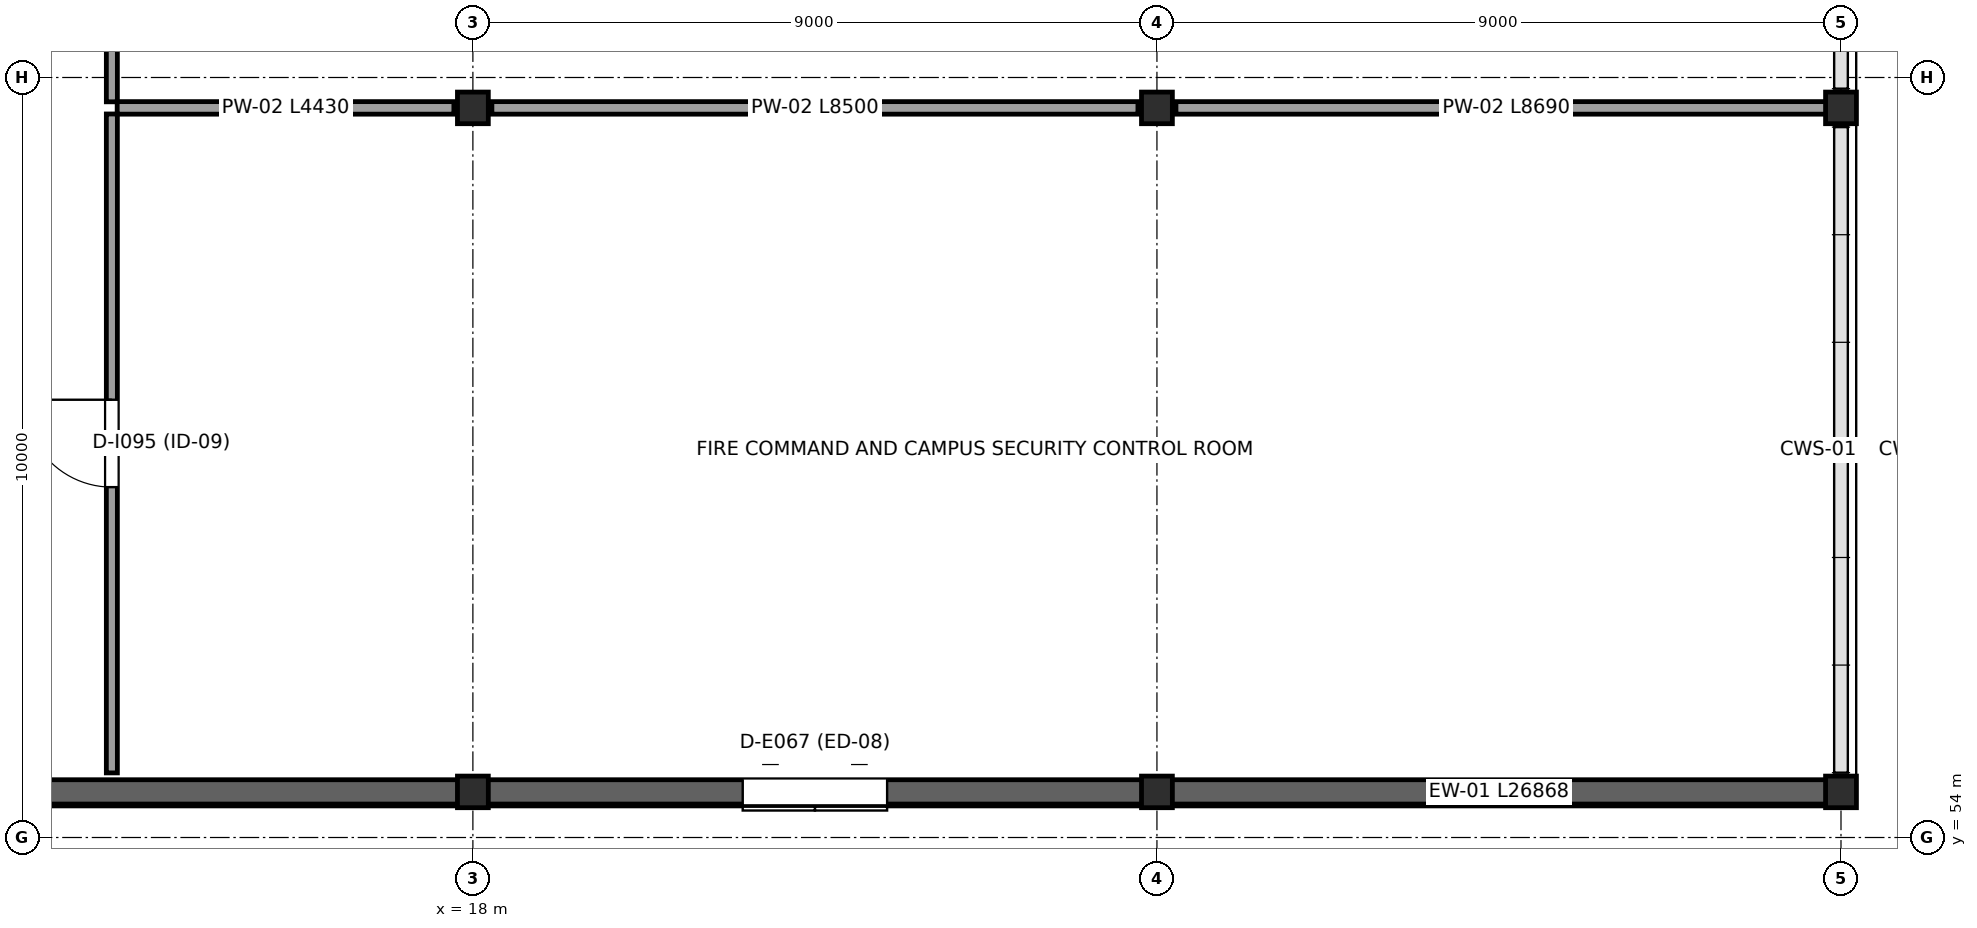
"""IFC4 building model, lengths in metres.
Left out: names, types, materials, properties, quantities, classifications, styles, units other than length and angle.
Written with IfcOpenShell. Run it as: python <this file> out.ifc"""

import sys

from ifc_helpers import new_model, si_unit, direction, frame, frame_2d, origin, origin_2d, place, context, subcontext, project, spatial, rectangle, i_section, extrude, element, fill, save


model = new_model("IFC4")
c1 = context("Model", 3, precision=1e-05, world=origin(), true_north=direction((0.0, 1.0)))
c2 = subcontext(c1, "Body", "Model", "MODEL_VIEW")
j1 = project(units=[si_unit("LENGTHUNIT", "METRE"), si_unit("PLANEANGLEUNIT", "RADIAN")], contexts=[c1])
p1 = place(None, origin())
s1 = spatial("IfcSite", under=j1, at=p1, CompositionType="ELEMENT")
p2 = place(p1, origin())
s2 = spatial("IfcBuilding", under=s1, at=p2, CompositionType="ELEMENT")
p3 = place(p2, origin())
s3 = spatial("IfcBuildingStorey", under=s2, at=p3, CompositionType="ELEMENT", Elevation=0.0)
for number, where, z_axis, x_axis in (
    (1, (18.0, 54.6, 0.0), (0.0, 0.0, 1.0), (1.0, 0.0, 0.0)),
    (2, (18.0, 63.6, 0.0), (0.0, 0.0, 1.0), (1.0, 0.0, 0.0)),
    (3, (27.0, 54.6, 0.0), (0.0, 0.0, 1.0), (1.0, 0.0, 0.0)),
    (4, (27.0, 63.6, 0.0), (0.0, 0.0, 1.0), (1.0, 0.0, 0.0)),
    (5, (36.0, 54.6, 0.0), (0.0, 0.0, 1.0), (1.0, 0.0, 0.0)),
    (6, (36.0, 63.6, 0.0), (0.0, 0.0, 1.0), (1.0, 0.0, 0.0)),
):
    element("IfcColumn", number, at=place(p3, frame(where, z_axis=z_axis, x_axis=x_axis)), inside=s3, PredefinedType="COLUMN", context=c2, shape_type="SweptSolid", body=[
        extrude(i_section(OverallWidth=0.406, OverallDepth=0.416, WebThickness=0.03, FlangeThickness=0.048, at=origin_2d()), origin(), (0.0, 0.0, 1.0), 6.0),
    ])
p4 = place(p3, frame((17.978, 54.6, 0.0), z_axis=(0.0, 0.0, 1.0), x_axis=(-1.0, 0.0, 0.0)))
e7 = element("IfcWall", 7, at=p4, inside=s3, PredefinedType="STANDARD", context=c2, shape_type="SweptSolid", body=[
    extrude(rectangle(XDim=8.956, YDim=0.32, at=frame_2d((4.478, 0.0))), origin(), (0.0, 0.0, 1.0), 5.78),
])
p5 = place(p3, frame((26.978, 54.6, 0.0), z_axis=(0.0, 0.0, 1.0), x_axis=(-1.0, 0.0, 0.0)))
e8 = element("IfcWall", 8, at=p5, inside=s3, PredefinedType="STANDARD", context=c2, shape_type="SweptSolid", body=[
    extrude(rectangle(XDim=8.956, YDim=0.32, at=frame_2d((4.478, 0.0))), origin(), (0.0, 0.0, 1.0), 5.78),
])
p6 = place(p5, frame((3.528, 0.0, 0.0)))
e9 = element("IfcOpeningElement", 9, at=p6, cuts=e8, PredefinedType="OPENING", context=c2, shape_type="SweptSolid", body=[
    extrude(rectangle(XDim=1.9, YDim=2.38, at=frame_2d((0.95, 1.19))), frame((0.0, 0.17, 0.0), z_axis=(0.0, -1.0, 0.0), x_axis=(1.0, 0.0, 0.0)), (0.0, 0.0, 1.0), 0.34),
])
p7 = place(p3, frame((35.978, 54.6, 0.0), z_axis=(0.0, 0.0, 1.0), x_axis=(-1.0, 0.0, 0.0)))
e10 = element("IfcWall", 10, at=p7, inside=s3, PredefinedType="STANDARD", context=c2, shape_type="SweptSolid", body=[
    extrude(rectangle(XDim=8.956, YDim=0.32, at=frame_2d((4.478, 0.0))), origin(), (0.0, 0.0, 1.0), 5.78),
])
p8 = place(p3, frame((13.25, 54.85, 0.0), z_axis=(0.0, 0.0, 1.0), x_axis=(0.0, 1.0, 0.0)))
e11 = element("IfcWall", 11, at=p8, inside=s3, PredefinedType="PARTITIONING", context=c2, shape_type="SweptSolid", body=[
    extrude(rectangle(XDim=8.67, YDim=0.145, at=frame_2d((4.335, 0.0))), origin(), (0.0, 0.0, 1.0), 4.65),
])
p9 = place(p8, frame((3.76, 0.0, 0.0)))
e12 = element("IfcOpeningElement", 12, at=p9, cuts=e11, PredefinedType="OPENING", context=c2, shape_type="SweptSolid", body=[
    extrude(rectangle(XDim=1.15, YDim=2.22, at=frame_2d((0.575, 1.11))), frame((0.0, 0.083, 0.0), z_axis=(0.0, -1.0, 0.0), x_axis=(1.0, 0.0, 0.0)), (0.0, 0.0, 1.0), 0.165),
])
p10 = place(p3, frame((13.25, 63.68, 0.0), z_axis=(0.0, 0.0, 1.0), x_axis=(0.0, 1.0, 0.0)))
e13 = element("IfcWall", 13, at=p10, inside=s3, PredefinedType="PARTITIONING", context=c2, shape_type="SweptSolid", body=[
    extrude(rectangle(XDim=18.24, YDim=0.145, at=frame_2d((9.12, 0.0))), origin(), (0.0, 0.0, 1.0), 4.65),
])
p11 = place(p10, frame((8.295, 0.0, 0.0)))
e14 = element("IfcOpeningElement", 14, at=p11, cuts=e13, PredefinedType="OPENING", context=c2, shape_type="SweptSolid", body=[
    extrude(rectangle(XDim=1.65, YDim=2.25, at=frame_2d((0.825, 1.125))), frame((0.0, 0.083, 0.0), z_axis=(0.0, -1.0, 0.0), x_axis=(1.0, 0.0, 0.0)), (0.0, 0.0, 1.0), 0.165),
])
p12 = place(p3, frame((13.32, 63.6, 0.0), z_axis=(0.0, 0.0, 1.0), x_axis=(1.0, 0.0, 0.0)))
e15 = element("IfcWall", 15, at=p12, inside=s3, PredefinedType="PARTITIONING", context=c2, shape_type="SweptSolid", body=[
    extrude(rectangle(XDim=4.43, YDim=0.165, at=frame_2d((2.215, 0.0))), origin(), (0.0, 0.0, 1.0), 4.65),
])
p13 = place(p3, frame((18.25, 63.6, 0.0), z_axis=(0.0, 0.0, 1.0), x_axis=(1.0, 0.0, 0.0)))
e16 = element("IfcWall", 16, at=p13, inside=s3, PredefinedType="PARTITIONING", context=c2, shape_type="SweptSolid", body=[
    extrude(rectangle(XDim=8.5, YDim=0.165, at=frame_2d((4.25, 0.0))), origin(), (0.0, 0.0, 1.0), 4.65),
])
p14 = place(p3, frame((27.25, 63.6, 0.0), z_axis=(0.0, 0.0, 1.0), x_axis=(1.0, 0.0, 0.0)))
e17 = element("IfcWall", 17, at=p14, inside=s3, PredefinedType="PARTITIONING", context=c2, shape_type="SweptSolid", body=[
    extrude(rectangle(XDim=8.69, YDim=0.165, at=frame_2d((4.345, 0.0))), origin(), (0.0, 0.0, 1.0), 4.65),
])
p15 = place(p6, origin())
e18 = element("IfcDoor", 18, at=p15, inside=s3, OperationType="DOUBLE_DOOR_SLIDING", PredefinedType="DOOR", context=c2, shape_type="SweptSolid", body=[
    extrude(rectangle(XDim=1.9, YDim=2.38, at=frame_2d((0.95, 1.19))), frame((0.0, 0.025, 0.0), z_axis=(0.0, -1.0, 0.0), x_axis=(1.0, 0.0, 0.0)), (0.0, 0.0, 1.0), 0.05),
])
fill(e9, e18)
p16 = place(p9, origin())
e19 = element("IfcDoor", 19, at=p16, inside=s3, OperationType="SINGLE_SWING_RIGHT", PredefinedType="DOOR", context=c2, shape_type="SweptSolid", body=[
    extrude(rectangle(XDim=1.15, YDim=2.22, at=frame_2d((0.575, 1.11))), frame((0.0, 0.025, 0.0), z_axis=(0.0, -1.0, 0.0), x_axis=(1.0, 0.0, 0.0)), (0.0, 0.0, 1.0), 0.05),
])
fill(e12, e19)
save(model, sys.argv[1])
